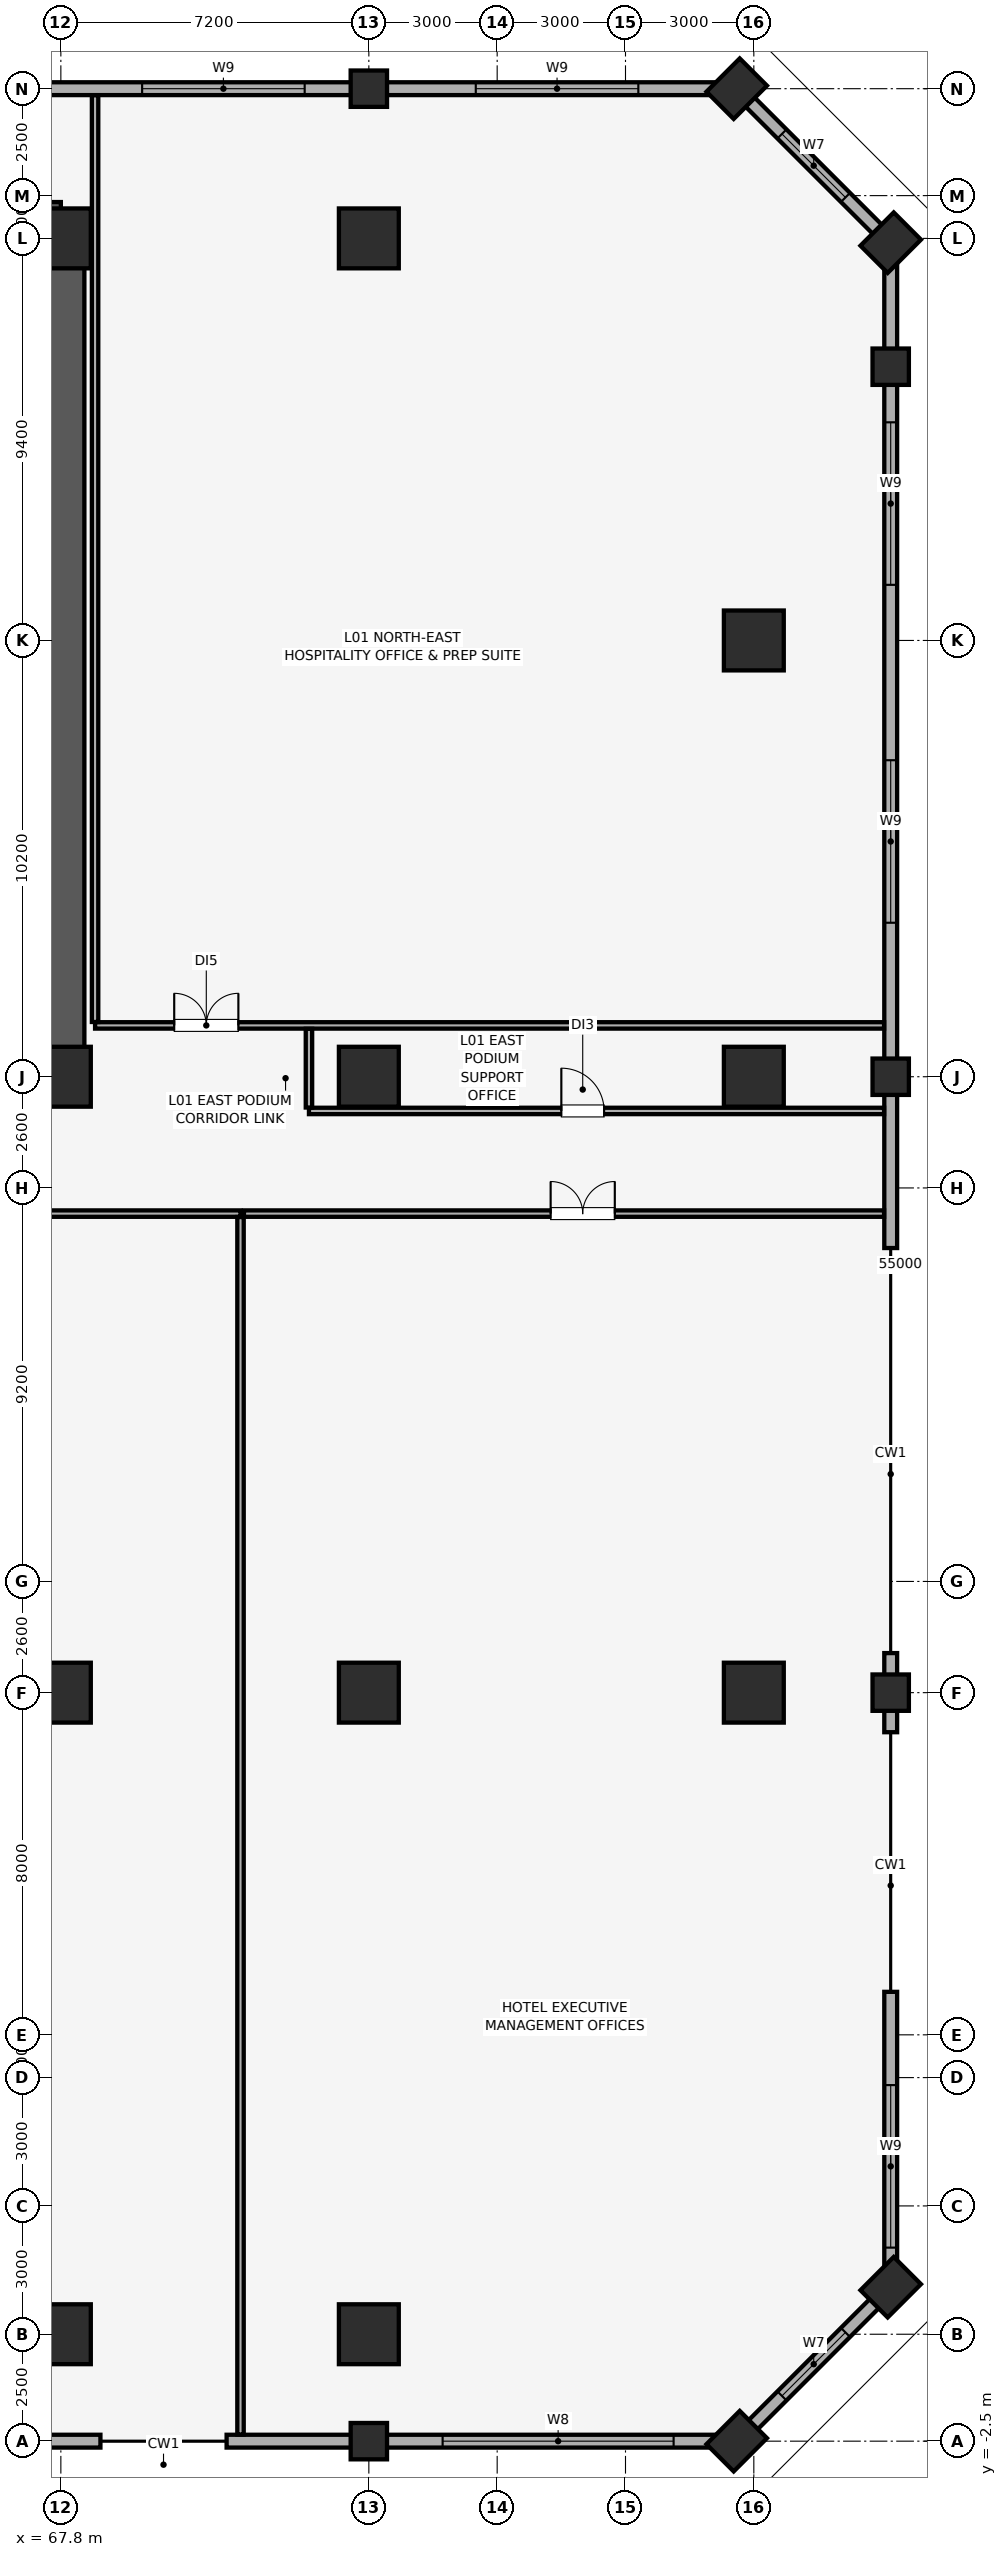
"""IFC4 building model, lengths in metres.
Left out: names, types, materials, properties, quantities, classifications, styles, units other than length and angle.
Written with IfcOpenShell. Run it as: python <this file> out.ifc"""

import sys

from ifc_helpers import new_model, si_unit, direction, frame, frame_2d, origin, origin_2d, place, context, subcontext, project, spatial, rectangle, extrude, element, fill, save


model = new_model("IFC4")
c1 = context("Model", 3, precision=1e-05, world=origin(), true_north=direction((0.0, 1.0)))
c2 = subcontext(c1, "Body", "Model", "MODEL_VIEW")
j1 = project(units=[si_unit("LENGTHUNIT", "METRE"), si_unit("PLANEANGLEUNIT", "RADIAN")], contexts=[c1])
p1 = place(None, origin())
s1 = spatial("IfcSite", under=j1, at=p1, CompositionType="ELEMENT")
p2 = place(p1, origin())
s2 = spatial("IfcBuilding", under=s1, at=p2, CompositionType="ELEMENT")
p3 = place(p2, frame((0.0, 0.0, 8.0)))
s3 = spatial("IfcBuildingStorey", under=s2, at=p3, CompositionType="ELEMENT", Elevation=8.0)
for number, where, z_axis, x_axis in (
    (1, (75.0, -2.5, 0.0), (0.0, 0.0, 1.0), (1.0, 0.0, 0.0)),
    (2, (75.0, 52.5, 0.0), (0.0, 0.0, 1.0), (1.0, 0.0, 0.0)),
    (3, (87.2, 15.0, 0.0), (0.0, 0.0, 1.0), (1.0, 0.0, 0.0)),
    (4, (87.2, 29.4, 0.0), (0.0, 0.0, 1.0), (1.0, 0.0, 0.0)),
    (5, (87.2, 46.0, 0.0), (0.0, 0.0, 1.0), (1.0, 0.0, 0.0)),
):
    element("IfcColumn", number, at=place(p3, frame(where, z_axis=z_axis, x_axis=x_axis)), inside=s3, PredefinedType="COLUMN", context=c2, shape_type="SweptSolid", body=[
        extrude(rectangle(XDim=0.85, YDim=0.85, at=origin_2d()), origin(), (0.0, 0.0, 1.0), 5.68),
    ])
for number, where, z_axis, x_axis in (
    (6, (83.6, -2.5, 0.0), (0.0, 0.0, 1.0), (0.707, 0.707, 0.0)),
    (7, (87.2, 1.1, 0.0), (0.0, 0.0, 1.0), (0.707, 0.707, 0.0)),
    (8, (87.2, 48.9, 0.0), (0.0, 0.0, 1.0), (0.707, 0.707, 0.0)),
    (9, (83.6, 52.5, 0.0), (0.0, 0.0, 1.0), (0.707, 0.707, 0.0)),
):
    element("IfcColumn", number, at=place(p3, frame(where, z_axis=z_axis, x_axis=x_axis)), inside=s3, PredefinedType="PILASTER", context=c2, shape_type="SweptSolid", body=[
        extrude(rectangle(XDim=1.1, YDim=0.9, at=origin_2d()), origin(), (0.0, 0.0, 1.0), 5.68),
    ])
for number, where, z_axis, x_axis in (
    (10, (67.8, 0.0, 0.0), (0.0, 0.0, 1.0), (1.0, 0.0, 0.0)),
    (11, (67.8, 29.4, 0.0), (0.0, 0.0, 1.0), (1.0, 0.0, 0.0)),
    (12, (67.8, 49.0, 0.0), (0.0, 0.0, 1.0), (1.0, 0.0, 0.0)),
    (13, (75.0, 0.0, 0.0), (0.0, 0.0, 1.0), (1.0, 0.0, 0.0)),
    (14, (75.0, 29.4, 0.0), (0.0, 0.0, 1.0), (1.0, 0.0, 0.0)),
    (15, (75.0, 49.0, 0.0), (0.0, 0.0, 1.0), (1.0, 0.0, 0.0)),
    (16, (75.0, 15.0, 0.0), (0.0, 0.0, 1.0), (1.0, 0.0, 0.0)),
    (17, (67.8, 15.0, 0.0), (0.0, 0.0, 1.0), (1.0, 0.0, 0.0)),
    (18, (84.0, 15.0, 0.0), (0.0, 0.0, 1.0), (1.0, 0.0, 0.0)),
    (19, (84.0, 29.4, 0.0), (0.0, 0.0, 1.0), (1.0, 0.0, 0.0)),
    (20, (84.0, 39.6, 0.0), (0.0, 0.0, 1.0), (1.0, 0.0, 0.0)),
):
    element("IfcColumn", number, at=place(p3, frame(where, z_axis=z_axis, x_axis=x_axis)), inside=s3, PredefinedType="COLUMN", context=c2, shape_type="SweptSolid", body=[
        extrude(rectangle(XDim=1.4, YDim=1.4, at=origin_2d()), origin(), (0.0, 0.0, 1.0), 5.68),
    ])
p4 = place(p3, frame((66.875, -2.5, 0.0), z_axis=(0.0, 0.0, 1.0), x_axis=(1.0, 0.0, 0.0)))
e21 = element("IfcWall", 21, at=p4, inside=s3, PredefinedType="SOLIDWALL", context=c2, shape_type="SweptSolid", body=[
    extrude(rectangle(XDim=1.85, YDim=0.3, at=frame_2d((0.925, 0.0))), origin(), (0.0, 0.0, 1.0), 4.73),
])
p5 = place(p3, frame((71.675, -2.5, 0.0), z_axis=(0.0, 0.0, 1.0), x_axis=(1.0, 0.0, 0.0)))
e22 = element("IfcWall", 22, at=p5, inside=s3, PredefinedType="SOLIDWALL", context=c2, shape_type="SweptSolid", body=[
    extrude(rectangle(XDim=11.925, YDim=0.3, at=frame_2d((5.962, 0.0))), origin(), (0.0, 0.0, 1.0), 4.73),
])
p6 = place(p5, frame((5.05, 0.0, 0.85)))
e23 = element("IfcOpeningElement", 23, at=p6, cuts=e22, PredefinedType="OPENING", context=c2, shape_type="SweptSolid", body=[
    extrude(rectangle(XDim=5.4, YDim=2.4, at=frame_2d((2.7, 1.2))), frame((0.0, 0.16, 0.0), z_axis=(0.0, -1.0, 0.0), x_axis=(1.0, 0.0, 0.0)), (0.0, 0.0, 1.0), 0.32),
])
p7 = place(p3, frame((83.6, -2.5, 0.0), z_axis=(0.0, 0.0, 1.0), x_axis=(0.707082803744, 0.707130757816, 0.0)))
e24 = element("IfcWall", 24, at=p7, inside=s3, PredefinedType="SOLIDWALL", context=c2, shape_type="SweptSolid", body=[
    extrude(rectangle(XDim=5.091, YDim=0.3, at=frame_2d((2.545, 0.0))), origin(), (0.0, 0.0, 1.0), 4.73),
])
p8 = place(p7, frame((1.496, 0.0, 0.85)))
e25 = element("IfcOpeningElement", 25, at=p8, cuts=e24, PredefinedType="OPENING", context=c2, shape_type="SweptSolid", body=[
    extrude(rectangle(XDim=2.1, YDim=1.6, at=frame_2d((1.05, 0.8))), frame((0.0, 0.16, 0.0), z_axis=(0.0, -1.0, 0.0), x_axis=(1.0, 0.0, 0.0)), (0.0, 0.0, 1.0), 0.32),
])
p9 = place(p3, frame((87.2, 1.1, 0.0), z_axis=(0.0, 0.0, 1.0), x_axis=(0.0, 1.0, 0.0)))
e26 = element("IfcWall", 26, at=p9, inside=s3, PredefinedType="SOLIDWALL", context=c2, shape_type="SweptSolid", body=[
    extrude(rectangle(XDim=6.905, YDim=0.3, at=frame_2d((3.452, 0.0))), origin(), (0.0, 0.0, 1.0), 4.73),
])
p10 = place(p9, frame((0.925, 0.0, 0.85)))
e27 = element("IfcOpeningElement", 27, at=p10, cuts=e26, PredefinedType="OPENING", context=c2, shape_type="SweptSolid", body=[
    extrude(rectangle(XDim=3.8, YDim=2.2, at=frame_2d((1.9, 1.1))), frame((0.0, 0.16, 0.0), z_axis=(0.0, -1.0, 0.0), x_axis=(1.0, 0.0, 0.0)), (0.0, 0.0, 1.0), 0.32),
])
p11 = place(p3, frame((87.2, 14.075, 0.0), z_axis=(0.0, 0.0, 1.0), x_axis=(0.0, 1.0, 0.0)))
e28 = element("IfcWall", 28, at=p11, inside=s3, PredefinedType="SOLIDWALL", context=c2, shape_type="SweptSolid", body=[
    extrude(rectangle(XDim=1.85, YDim=0.3, at=frame_2d((0.925, 0.0))), origin(), (0.0, 0.0, 1.0), 4.73),
])
p12 = place(p3, frame((87.2, 25.395, 0.0), z_axis=(0.0, 0.0, 1.0), x_axis=(0.0, 1.0, 0.0)))
e29 = element("IfcWall", 29, at=p12, inside=s3, PredefinedType="SOLIDWALL", context=c2, shape_type="SweptSolid", body=[
    extrude(rectangle(XDim=23.505, YDim=0.3, at=frame_2d((11.752, 0.0))), origin(), (0.0, 0.0, 1.0), 4.73),
])
p13 = place(p12, frame((7.605, 0.0, 0.85)))
e30 = element("IfcOpeningElement", 30, at=p13, cuts=e29, PredefinedType="OPENING", context=c2, shape_type="SweptSolid", body=[
    extrude(rectangle(XDim=3.8, YDim=2.2, at=frame_2d((1.9, 1.1))), frame((0.0, 0.16, 0.0), z_axis=(0.0, -1.0, 0.0), x_axis=(1.0, 0.0, 0.0)), (0.0, 0.0, 1.0), 0.32),
])
p14 = place(p12, frame((15.505, 0.0, 0.85)))
e31 = element("IfcOpeningElement", 31, at=p14, cuts=e29, PredefinedType="OPENING", context=c2, shape_type="SweptSolid", body=[
    extrude(rectangle(XDim=3.8, YDim=2.2, at=frame_2d((1.9, 1.1))), frame((0.0, 0.16, 0.0), z_axis=(0.0, -1.0, 0.0), x_axis=(1.0, 0.0, 0.0)), (0.0, 0.0, 1.0), 0.32),
])
p15 = place(p3, frame((87.2, 48.9, 0.0), z_axis=(0.0, 0.0, 1.0), x_axis=(-0.707082803744, 0.707130757816, 0.0)))
e32 = element("IfcWall", 32, at=p15, inside=s3, PredefinedType="SOLIDWALL", context=c2, shape_type="SweptSolid", body=[
    extrude(rectangle(XDim=5.091, YDim=0.3, at=frame_2d((2.545, 0.0))), origin(), (0.0, 0.0, 1.0), 4.73),
])
p16 = place(p15, frame((1.496, 0.0, 0.85)))
e33 = element("IfcOpeningElement", 33, at=p16, cuts=e32, PredefinedType="OPENING", context=c2, shape_type="SweptSolid", body=[
    extrude(rectangle(XDim=2.1, YDim=1.6, at=frame_2d((1.05, 0.8))), frame((0.0, 0.16, 0.0), z_axis=(0.0, -1.0, 0.0), x_axis=(1.0, 0.0, 0.0)), (0.0, 0.0, 1.0), 0.32),
])
p17 = place(p3, frame((83.6, 52.5, 0.0), z_axis=(0.0, 0.0, 1.0), x_axis=(-1.0, 0.0, 0.0)))
e34 = element("IfcWall", 34, at=p17, inside=s3, PredefinedType="SOLIDWALL", context=c2, shape_type="SweptSolid", body=[
    extrude(rectangle(XDim=83.2, YDim=0.3, at=frame_2d((41.6, 0.0))), origin(), (0.0, 0.0, 1.0), 4.73),
])
p18 = place(p17, frame((77.1, 0.0, 0.85)))
e35 = element("IfcOpeningElement", 35, at=p18, cuts=e34, PredefinedType="OPENING", context=c2, shape_type="SweptSolid", body=[
    extrude(rectangle(XDim=3.8, YDim=2.2, at=frame_2d((1.9, 1.1))), frame((0.0, 0.16, 0.0), z_axis=(0.0, -1.0, 0.0), x_axis=(1.0, 0.0, 0.0)), (0.0, 0.0, 1.0), 0.32),
])
p19 = place(p17, frame((69.15, 0.0, 0.85)))
e36 = element("IfcOpeningElement", 36, at=p19, cuts=e34, PredefinedType="OPENING", context=c2, shape_type="SweptSolid", body=[
    extrude(rectangle(XDim=3.8, YDim=2.2, at=frame_2d((1.9, 1.1))), frame((0.0, 0.16, 0.0), z_axis=(0.0, -1.0, 0.0), x_axis=(1.0, 0.0, 0.0)), (0.0, 0.0, 1.0), 0.32),
])
p20 = place(p17, frame((10.1, 0.0, 0.85)))
e37 = element("IfcOpeningElement", 37, at=p20, cuts=e34, PredefinedType="OPENING", context=c2, shape_type="SweptSolid", body=[
    extrude(rectangle(XDim=3.8, YDim=2.2, at=frame_2d((1.9, 1.1))), frame((0.0, 0.16, 0.0), z_axis=(0.0, -1.0, 0.0), x_axis=(1.0, 0.0, 0.0)), (0.0, 0.0, 1.0), 0.32),
])
p21 = place(p17, frame((2.3, 0.0, 0.85)))
e38 = element("IfcOpeningElement", 38, at=p21, cuts=e34, PredefinedType="OPENING", context=c2, shape_type="SweptSolid", body=[
    extrude(rectangle(XDim=3.8, YDim=2.2, at=frame_2d((1.9, 1.1))), frame((0.0, 0.16, 0.0), z_axis=(0.0, -1.0, 0.0), x_axis=(1.0, 0.0, 0.0)), (0.0, 0.0, 1.0), 0.32),
])
p22 = place(p3, frame((16.2, 49.3, 0.0), z_axis=(0.0, 0.0, 1.0), x_axis=(1.0, 0.0, 0.0)))
e39 = element("IfcWall", 39, at=p22, inside=s3, PredefinedType="SHEAR", context=c2, shape_type="SweptSolid", body=[
    extrude(rectangle(XDim=51.6, YDim=1.1, at=frame_2d((25.8, 0.0))), origin(), (0.0, 0.0, 1.0), 5.68),
])
p23 = place(p3, frame((67.8, 29.4, 0.0), z_axis=(0.0, 0.0, 1.0), x_axis=(0.0, 1.0, 0.0)))
e40 = element("IfcWall", 40, at=p23, inside=s3, PredefinedType="SHEAR", context=c2, shape_type="SweptSolid", body=[
    extrude(rectangle(XDim=19.2, YDim=1.1, at=frame_2d((9.6, 0.0))), origin(), (0.0, 0.0, 1.0), 5.68),
])
p24 = place(p3, frame((68.6, 30.6, 0.0), z_axis=(0.0, 0.0, 1.0), x_axis=(1.0, 0.0, 0.0)))
e41 = element("IfcWall", 41, at=p24, inside=s3, PredefinedType="PARTITIONING", context=c2, shape_type="SweptSolid", body=[
    extrude(rectangle(XDim=18.445, YDim=0.15, at=frame_2d((9.222, 0.0))), origin(), (0.0, 0.0, 1.0), 5.68),
])
p25 = place(p24, frame((1.85, 0.0, 0.0)))
e42 = element("IfcOpeningElement", 42, at=p25, cuts=e41, PredefinedType="OPENING", context=c2, shape_type="SweptSolid", body=[
    extrude(rectangle(XDim=1.5, YDim=2.25, at=frame_2d((0.75, 1.125))), frame((0.0, 0.085, 0.0), z_axis=(0.0, -1.0, 0.0), x_axis=(1.0, 0.0, 0.0)), (0.0, 0.0, 1.0), 0.17),
])
p26 = place(p3, frame((68.6, 30.68, 0.0), z_axis=(0.0, 0.0, 1.0), x_axis=(0.0, 1.0, 0.0)))
e43 = element("IfcWall", 43, at=p26, inside=s3, PredefinedType="PARTITIONING", context=c2, shape_type="SweptSolid", body=[
    extrude(rectangle(XDim=21.665, YDim=0.15, at=frame_2d((10.833, 0.0))), origin(), (0.0, 0.0, 1.0), 5.68),
])
p27 = place(p3, frame((73.6, 28.6, 0.0), z_axis=(0.0, 0.0, 1.0), x_axis=(1.0, 0.0, 0.0)))
e44 = element("IfcWall", 44, at=p27, inside=s3, PredefinedType="PARTITIONING", context=c2, shape_type="SweptSolid", body=[
    extrude(rectangle(XDim=13.445, YDim=0.15, at=frame_2d((6.722, 0.0))), origin(), (0.0, 0.0, 1.0), 5.68),
])
p28 = place(p27, frame((5.9, 0.0, 0.0)))
e45 = element("IfcOpeningElement", 45, at=p28, cuts=e44, PredefinedType="OPENING", context=c2, shape_type="SweptSolid", body=[
    extrude(rectangle(XDim=1.0, YDim=2.15, at=frame_2d((0.5, 1.075))), frame((0.0, 0.085, 0.0), z_axis=(0.0, -1.0, 0.0), x_axis=(1.0, 0.0, 0.0)), (0.0, 0.0, 1.0), 0.17),
])
p29 = place(p3, frame((73.6, 28.68, 0.0), z_axis=(0.0, 0.0, 1.0), x_axis=(0.0, 1.0, 0.0)))
e46 = element("IfcWall", 46, at=p29, inside=s3, PredefinedType="PARTITIONING", context=c2, shape_type="SweptSolid", body=[
    extrude(rectangle(XDim=1.84, YDim=0.15, at=frame_2d((0.92, 0.0))), origin(), (0.0, 0.0, 1.0), 5.68),
])
p30 = place(p3, frame((44.08, 26.2, 0.0), z_axis=(0.0, 0.0, 1.0), x_axis=(1.0, 0.0, 0.0)))
e47 = element("IfcWall", 47, at=p30, inside=s3, PredefinedType="PARTITIONING", context=c2, shape_type="SweptSolid", body=[
    extrude(rectangle(XDim=27.92, YDim=0.15, at=frame_2d((13.96, 0.0))), origin(), (0.0, 0.0, 1.0), 5.68),
])
p31 = place(p30, frame((13.17, 0.0, 0.0)))
e48 = element("IfcOpeningElement", 48, at=p31, cuts=e47, PredefinedType="OPENING", context=c2, shape_type="SweptSolid", body=[
    extrude(rectangle(XDim=1.5, YDim=2.25, at=frame_2d((0.75, 1.125))), frame((0.0, 0.085, 0.0), z_axis=(0.0, -1.0, 0.0), x_axis=(1.0, 0.0, 0.0)), (0.0, 0.0, 1.0), 0.17),
])
p32 = place(p3, frame((72.0, -2.345, 0.0), z_axis=(0.0, 0.0, 1.0), x_axis=(0.0, 1.0, 0.0)))
e49 = element("IfcWall", 49, at=p32, inside=s3, PredefinedType="PARTITIONING", context=c2, shape_type="SweptSolid", body=[
    extrude(rectangle(XDim=28.465, YDim=0.15, at=frame_2d((14.232, 0.0))), origin(), (0.0, 0.0, 1.0), 5.68),
])
p33 = place(p3, frame((72.08, 26.2, 0.0), z_axis=(0.0, 0.0, 1.0), x_axis=(1.0, 0.0, 0.0)))
e50 = element("IfcWall", 50, at=p33, inside=s3, PredefinedType="PARTITIONING", context=c2, shape_type="SweptSolid", body=[
    extrude(rectangle(XDim=14.965, YDim=0.15, at=frame_2d((7.482, 0.0))), origin(), (0.0, 0.0, 1.0), 5.68),
])
p34 = place(p33, frame((7.17, 0.0, 0.0)))
e51 = element("IfcOpeningElement", 51, at=p34, cuts=e50, PredefinedType="OPENING", context=c2, shape_type="SweptSolid", body=[
    extrude(rectangle(XDim=1.5, YDim=2.25, at=frame_2d((0.75, 1.125))), frame((0.0, 0.085, 0.0), z_axis=(0.0, -1.0, 0.0), x_axis=(1.0, 0.0, 0.0)), (0.0, 0.0, 1.0), 0.17),
])
p35 = place(p8, origin())
e52 = element("IfcWindow", 52, at=p35, inside=s3, PartitioningType="SINGLE_PANEL", PredefinedType="WINDOW", context=c2, shape_type="SweptSolid", body=[
    extrude(rectangle(XDim=2.1, YDim=1.6, at=frame_2d((1.05, 0.8))), frame((0.0, 0.03, 0.0), z_axis=(0.0, -1.0, 0.0), x_axis=(1.0, 0.0, 0.0)), (0.0, 0.0, 1.0), 0.06),
])
fill(e25, e52)
p36 = place(p16, origin())
e53 = element("IfcWindow", 53, at=p36, inside=s3, PartitioningType="SINGLE_PANEL", PredefinedType="WINDOW", context=c2, shape_type="SweptSolid", body=[
    extrude(rectangle(XDim=2.1, YDim=1.6, at=frame_2d((1.05, 0.8))), frame((0.0, 0.03, 0.0), z_axis=(0.0, -1.0, 0.0), x_axis=(1.0, 0.0, 0.0)), (0.0, 0.0, 1.0), 0.06),
])
fill(e33, e53)
p37 = place(p6, origin())
e54 = element("IfcWindow", 54, at=p37, inside=s3, PartitioningType="SINGLE_PANEL", PredefinedType="WINDOW", context=c2, shape_type="SweptSolid", body=[
    extrude(rectangle(XDim=5.4, YDim=2.4, at=frame_2d((2.7, 1.2))), frame((0.0, 0.03, 0.0), z_axis=(0.0, -1.0, 0.0), x_axis=(1.0, 0.0, 0.0)), (0.0, 0.0, 1.0), 0.06),
])
fill(e23, e54)
p38 = place(p10, origin())
e55 = element("IfcWindow", 55, at=p38, inside=s3, PartitioningType="SINGLE_PANEL", PredefinedType="WINDOW", context=c2, shape_type="SweptSolid", body=[
    extrude(rectangle(XDim=3.8, YDim=2.2, at=frame_2d((1.9, 1.1))), frame((0.0, 0.03, 0.0), z_axis=(0.0, -1.0, 0.0), x_axis=(1.0, 0.0, 0.0)), (0.0, 0.0, 1.0), 0.06),
])
fill(e27, e55)
p39 = place(p13, origin())
e56 = element("IfcWindow", 56, at=p39, inside=s3, PartitioningType="SINGLE_PANEL", PredefinedType="WINDOW", context=c2, shape_type="SweptSolid", body=[
    extrude(rectangle(XDim=3.8, YDim=2.2, at=frame_2d((1.9, 1.1))), frame((0.0, 0.03, 0.0), z_axis=(0.0, -1.0, 0.0), x_axis=(1.0, 0.0, 0.0)), (0.0, 0.0, 1.0), 0.06),
])
fill(e30, e56)
p40 = place(p14, origin())
e57 = element("IfcWindow", 57, at=p40, inside=s3, PartitioningType="SINGLE_PANEL", PredefinedType="WINDOW", context=c2, shape_type="SweptSolid", body=[
    extrude(rectangle(XDim=3.8, YDim=2.2, at=frame_2d((1.9, 1.1))), frame((0.0, 0.03, 0.0), z_axis=(0.0, -1.0, 0.0), x_axis=(1.0, 0.0, 0.0)), (0.0, 0.0, 1.0), 0.06),
])
fill(e31, e57)
p41 = place(p20, origin())
e58 = element("IfcWindow", 58, at=p41, inside=s3, PartitioningType="SINGLE_PANEL", PredefinedType="WINDOW", context=c2, shape_type="SweptSolid", body=[
    extrude(rectangle(XDim=3.8, YDim=2.2, at=frame_2d((1.9, 1.1))), frame((0.0, 0.03, 0.0), z_axis=(0.0, -1.0, 0.0), x_axis=(1.0, 0.0, 0.0)), (0.0, 0.0, 1.0), 0.06),
])
fill(e37, e58)
p42 = place(p21, origin())
e59 = element("IfcWindow", 59, at=p42, inside=s3, PartitioningType="SINGLE_PANEL", PredefinedType="WINDOW", context=c2, shape_type="SweptSolid", body=[
    extrude(rectangle(XDim=3.8, YDim=2.2, at=frame_2d((1.9, 1.1))), frame((0.0, 0.03, 0.0), z_axis=(0.0, -1.0, 0.0), x_axis=(1.0, 0.0, 0.0)), (0.0, 0.0, 1.0), 0.06),
])
fill(e38, e59)
p43 = place(p25, origin())
e60 = element("IfcDoor", 60, at=p43, inside=s3, OperationType="DOUBLE_DOOR_SINGLE_SWING", PredefinedType="DOOR", context=c2, shape_type="SweptSolid", body=[
    extrude(rectangle(XDim=1.5, YDim=2.25, at=frame_2d((0.75, 1.125))), frame((0.0, 0.025, 0.0), z_axis=(0.0, -1.0, 0.0), x_axis=(1.0, 0.0, 0.0)), (0.0, 0.0, 1.0), 0.05),
])
fill(e42, e60)
p44 = place(p28, origin())
e61 = element("IfcDoor", 61, at=p44, inside=s3, OperationType="SINGLE_SWING_LEFT", PredefinedType="DOOR", context=c2, shape_type="SweptSolid", body=[
    extrude(rectangle(XDim=1.0, YDim=2.15, at=frame_2d((0.5, 1.075))), frame((0.0, 0.025, 0.0), z_axis=(0.0, -1.0, 0.0), x_axis=(1.0, 0.0, 0.0)), (0.0, 0.0, 1.0), 0.05),
])
fill(e45, e61)
p45 = place(p34, origin())
e62 = element("IfcDoor", 62, at=p45, inside=s3, OperationType="DOUBLE_DOOR_SINGLE_SWING", PredefinedType="DOOR", context=c2, shape_type="SweptSolid", body=[
    extrude(rectangle(XDim=1.5, YDim=2.25, at=frame_2d((0.75, 1.125))), frame((0.0, 0.025, 0.0), z_axis=(0.0, -1.0, 0.0), x_axis=(1.0, 0.0, 0.0)), (0.0, 0.0, 1.0), 0.05),
])
fill(e51, e62)
save(model, sys.argv[1])
